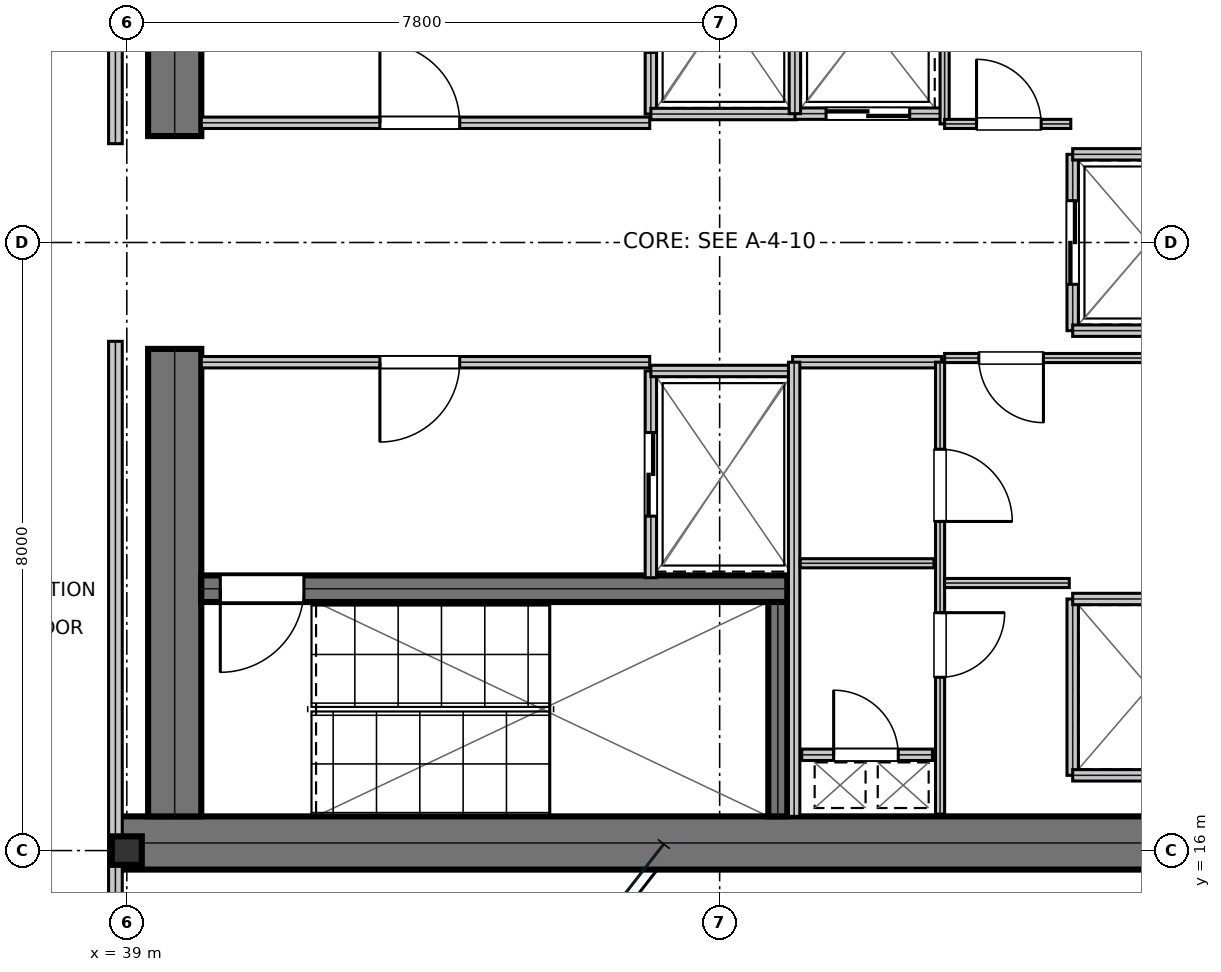
"""IFC4 building model, lengths in metres.
Left out: names, types, materials, properties, quantities, classifications, styles, units other than length and angle.
Written with IfcOpenShell. Run it as: python <this file> out.ifc"""

import sys

from ifc_helpers import new_model, si_unit, direction, frame, frame_2d, origin, origin_2d, place, context, subcontext, project, spatial, rectangle, i_section, extrude, element, fill, save


model = new_model("IFC4")
c1 = context("Model", 3, precision=1e-05, world=origin(), true_north=direction((0.0, 1.0)))
c2 = subcontext(c1, "Body", "Model", "MODEL_VIEW")
j1 = project(units=[si_unit("LENGTHUNIT", "METRE"), si_unit("PLANEANGLEUNIT", "RADIAN")], contexts=[c1])
p1 = place(None, origin())
s1 = spatial("IfcSite", under=j1, at=p1, CompositionType="ELEMENT")
p2 = place(p1, origin())
s2 = spatial("IfcBuilding", under=s1, at=p2, CompositionType="ELEMENT")
p3 = place(p2, frame((0.0, 0.0, 248.55)))
s3 = spatial("IfcBuildingStorey", under=s2, at=p3, CompositionType="ELEMENT", Elevation=248.55)
p4 = place(p3, frame((38.8, 16.1, 0.0), z_axis=(0.0, 0.0, 1.0), x_axis=(1.0, 0.0, 0.0)))
e1 = element("IfcWall", 1, at=p4, inside=s3, PredefinedType="SHEAR", context=c2, shape_type="SweptSolid", body=[
    extrude(rectangle(XDim=16.0, YDim=0.7, at=frame_2d((8.0, 0.0))), origin(), (0.0, 0.0, 1.0), 3.79),
])
for number, where, z_axis, x_axis in (
    (2, (39.63, 16.45, 0.0), (0.0, 0.0, 1.0), (0.0, 1.0, 0.0)),
    (3, (39.63, 25.4, 0.0), (0.0, 0.0, 1.0), (0.0, 1.0, 0.0)),
):
    element("IfcWall", number, at=place(p3, frame(where, z_axis=z_axis, x_axis=x_axis)), inside=s3, PredefinedType="SHEAR", context=c2, shape_type="SweptSolid", body=[
        extrude(rectangle(XDim=6.15, YDim=0.7, at=frame_2d((3.075, 0.0))), origin(), (0.0, 0.0, 1.0), 3.79),
    ])
p5 = place(p3, frame((39.98, 19.445, 0.0), z_axis=(0.0, 0.0, 1.0), x_axis=(1.0, 0.0, 0.0)))
e4 = element("IfcWall", 4, at=p5, inside=s3, PredefinedType="SHEAR", context=c2, shape_type="SweptSolid", body=[
    extrude(rectangle(XDim=7.71, YDim=0.35, at=frame_2d((3.855, 0.0))), origin(), (0.0, 0.0, 1.0), 3.79),
])
p6 = place(p5, frame((0.25, 0.0, 0.0)))
e5 = element("IfcOpeningElement", 5, at=p6, cuts=e4, PredefinedType="OPENING", context=c2, shape_type="SweptSolid", body=[
    extrude(rectangle(XDim=1.1, YDim=2.15, at=frame_2d((0.55, 1.075))), frame((0.0, 0.185, 0.0), z_axis=(0.0, -1.0, 0.0), x_axis=(1.0, 0.0, 0.0)), (0.0, 0.0, 1.0), 0.37),
])
p7 = place(p3, frame((47.565, 16.45, 0.0), z_axis=(0.0, 0.0, 1.0), x_axis=(0.0, 1.0, 0.0)))
e6 = element("IfcWall", 6, at=p7, inside=s3, PredefinedType="SHEAR", context=c2, shape_type="SweptSolid", body=[
    extrude(rectangle(XDim=2.82, YDim=0.25, at=frame_2d((1.41, 0.0))), origin(), (0.0, 0.0, 1.0), 3.79),
])
p8 = place(p3, frame((39.0, 16.0, 0.0), z_axis=(0.0, 0.0, 1.0), x_axis=(1.0, 0.0, 0.0)))
e7 = element("IfcColumn", 7, at=p8, inside=s3, PredefinedType="COLUMN", context=c2, shape_type="SweptSolid", body=[
    extrude(i_section(OverallWidth=0.394, OverallDepth=0.375, WebThickness=0.017, FlangeThickness=0.028, at=origin_2d()), origin(), (0.0, 0.0, 1.0), 4.044),
])
p9 = place(p3, frame((39.98, 25.575, 0.0), z_axis=(0.0, 0.0, 1.0), x_axis=(1.0, 0.0, 0.0)))
e8 = element("IfcWall", 8, at=p9, inside=s3, PredefinedType="PARTITIONING", context=c2, shape_type="SweptSolid", body=[
    extrude(rectangle(XDim=5.9, YDim=0.15, at=frame_2d((2.95, 0.0))), origin(), (0.0, 0.0, 1.0), 3.79),
])
p10 = place(p9, frame((2.35, 0.0, 0.0)))
e9 = element("IfcOpeningElement", 9, at=p10, cuts=e8, PredefinedType="OPENING", context=c2, shape_type="SweptSolid", body=[
    extrude(rectangle(XDim=1.05, YDim=2.15, at=frame_2d((0.525, 1.075))), frame((0.0, 0.085, 0.0), z_axis=(0.0, -1.0, 0.0), x_axis=(1.0, 0.0, 0.0)), (0.0, 0.0, 1.0), 0.17),
])
p11 = place(p3, frame((39.98, 22.425, 0.0), z_axis=(0.0, 0.0, 1.0), x_axis=(1.0, 0.0, 0.0)))
e10 = element("IfcWall", 10, at=p11, inside=s3, PredefinedType="PARTITIONING", context=c2, shape_type="SweptSolid", body=[
    extrude(rectangle(XDim=5.9, YDim=0.15, at=frame_2d((2.95, 0.0))), origin(), (0.0, 0.0, 1.0), 3.79),
])
p12 = place(p11, frame((2.35, 0.0, 0.0)))
e11 = element("IfcOpeningElement", 11, at=p12, cuts=e10, PredefinedType="OPENING", context=c2, shape_type="SweptSolid", body=[
    extrude(rectangle(XDim=1.05, YDim=2.15, at=frame_2d((0.525, 1.075))), frame((0.0, 0.085, 0.0), z_axis=(0.0, -1.0, 0.0), x_axis=(1.0, 0.0, 0.0)), (0.0, 0.0, 1.0), 0.17),
])
p13 = place(p3, frame((45.895, 25.69, 0.0), z_axis=(0.0, 0.0, 1.0), x_axis=(0.0, 1.0, 0.0)))
e12 = element("IfcWall", 12, at=p13, inside=s3, PredefinedType="PARTITIONING", context=c2, shape_type="SweptSolid", body=[
    extrude(rectangle(XDim=2.72, YDim=0.15, at=frame_2d((1.36, 0.0))), origin(), (0.0, 0.0, 1.0), 3.79),
])
p14 = place(p13, frame((0.81, 0.0, 0.0)))
e13 = element("IfcOpeningElement", 13, at=p14, cuts=e12, PredefinedType="OPENING", context=c2, shape_type="SweptSolid", body=[
    extrude(rectangle(XDim=1.1, YDim=2.15, at=frame_2d((0.55, 1.075))), frame((0.0, 0.085, 0.0), z_axis=(0.0, -1.0, 0.0), x_axis=(1.0, 0.0, 0.0)), (0.0, 0.0, 1.0), 0.17),
])
p15 = place(p3, frame((45.895, 25.69, 0.0), z_axis=(0.0, 0.0, 1.0), x_axis=(1.0, 0.0, 0.0)))
e14 = element("IfcWall", 14, at=p15, inside=s3, PredefinedType="PARTITIONING", context=c2, shape_type="SweptSolid", body=[
    extrude(rectangle(XDim=1.915, YDim=0.15, at=frame_2d((0.958, 0.0))), origin(), (0.0, 0.0, 1.0), 3.79),
])
p16 = place(p3, frame((45.895, 19.59, 0.0), z_axis=(0.0, 0.0, 1.0), x_axis=(0.0, 1.0, 0.0)))
e15 = element("IfcWall", 15, at=p16, inside=s3, PredefinedType="PARTITIONING", context=c2, shape_type="SweptSolid", body=[
    extrude(rectangle(XDim=2.72, YDim=0.15, at=frame_2d((1.36, 0.0))), origin(), (0.0, 0.0, 1.0), 3.79),
])
p17 = place(p16, frame((0.81, 0.0, 0.0)))
e16 = element("IfcOpeningElement", 16, at=p17, cuts=e15, PredefinedType="OPENING", context=c2, shape_type="SweptSolid", body=[
    extrude(rectangle(XDim=1.1, YDim=2.15, at=frame_2d((0.55, 1.075))), frame((0.0, 0.085, 0.0), z_axis=(0.0, -1.0, 0.0), x_axis=(1.0, 0.0, 0.0)), (0.0, 0.0, 1.0), 0.17),
])
p18 = place(p3, frame((45.895, 22.31, 0.0), z_axis=(0.0, 0.0, 1.0), x_axis=(1.0, 0.0, 0.0)))
e17 = element("IfcWall", 17, at=p18, inside=s3, PredefinedType="PARTITIONING", context=c2, shape_type="SweptSolid", body=[
    extrude(rectangle(XDim=1.915, YDim=0.15, at=frame_2d((0.958, 0.0))), origin(), (0.0, 0.0, 1.0), 3.79),
])
p19 = place(p3, frame((47.79, 25.695, 0.0), z_axis=(0.0, 0.0, 1.0), x_axis=(1.0, 0.0, 0.0)))
e18 = element("IfcWall", 18, at=p19, inside=s3, PredefinedType="PARTITIONING", context=c2, shape_type="SweptSolid", body=[
    extrude(rectangle(XDim=1.92, YDim=0.15, at=frame_2d((0.96, 0.0))), origin(), (0.0, 0.0, 1.0), 3.79),
])
p20 = place(p19, frame((0.41, 0.0, 0.0)))
e19 = element("IfcOpeningElement", 19, at=p20, cuts=e18, PredefinedType="OPENING", context=c2, shape_type="SweptSolid", body=[
    extrude(rectangle(XDim=1.1, YDim=2.15, at=frame_2d((0.55, 1.075))), frame((0.0, 0.085, 0.0), z_axis=(0.0, -1.0, 0.0), x_axis=(1.0, 0.0, 0.0)), (0.0, 0.0, 1.0), 0.17),
])
p21 = place(p3, frame((47.79, 25.695, 0.0), z_axis=(0.0, 0.0, 1.0), x_axis=(0.0, 1.0, 0.0)))
e20 = element("IfcWall", 20, at=p21, inside=s3, PredefinedType="PARTITIONING", context=c2, shape_type="SweptSolid", body=[
    extrude(rectangle(XDim=2.415, YDim=0.15, at=frame_2d((1.208, 0.0))), origin(), (0.0, 0.0, 1.0), 3.79),
])
p22 = place(p3, frame((51.445, 22.84, 0.0), z_axis=(0.0, 0.0, 1.0), x_axis=(0.0, 1.0, 0.0)))
e21 = element("IfcWall", 21, at=p22, inside=s3, PredefinedType="PARTITIONING", context=c2, shape_type="SweptSolid", body=[
    extrude(rectangle(XDim=2.32, YDim=0.15, at=frame_2d((1.16, 0.0))), origin(), (0.0, 0.0, 1.0), 3.79),
])
p23 = place(p22, frame((0.61, 0.0, 0.0)))
e22 = element("IfcOpeningElement", 22, at=p23, cuts=e21, PredefinedType="OPENING", context=c2, shape_type="SweptSolid", body=[
    extrude(rectangle(XDim=1.1, YDim=2.15, at=frame_2d((0.55, 1.075))), frame((0.0, 0.085, 0.0), z_axis=(0.0, -1.0, 0.0), x_axis=(1.0, 0.0, 0.0)), (0.0, 0.0, 1.0), 0.17),
])
for number, where, z_axis, x_axis in (
    (23, (51.445, 22.84, 0.0), (0.0, 0.0, 1.0), (1.0, 0.0, 0.0)),
    (24, (51.445, 25.16, 0.0), (0.0, 0.0, 1.0), (1.0, 0.0, 0.0)),
):
    element("IfcWall", number, at=place(p3, frame(where, z_axis=z_axis, x_axis=x_axis)), inside=s3, PredefinedType="PARTITIONING", context=c2, shape_type="SweptSolid", body=[
        extrude(rectangle(XDim=2.015, YDim=0.15, at=frame_2d((1.007, 0.0))), origin(), (0.0, 0.0, 1.0), 3.79),
    ])
p24 = place(p3, frame((51.445, 16.99, 0.0), z_axis=(0.0, 0.0, 1.0), x_axis=(0.0, 1.0, 0.0)))
e25 = element("IfcWall", 25, at=p24, inside=s3, PredefinedType="PARTITIONING", context=c2, shape_type="SweptSolid", body=[
    extrude(rectangle(XDim=2.32, YDim=0.15, at=frame_2d((1.16, 0.0))), origin(), (0.0, 0.0, 1.0), 3.79),
])
for number, where, z_axis, x_axis in (
    (26, (51.445, 16.99, 0.0), (0.0, 0.0, 1.0), (1.0, 0.0, 0.0)),
    (27, (51.445, 19.31, 0.0), (0.0, 0.0, 1.0), (1.0, 0.0, 0.0)),
):
    element("IfcWall", number, at=place(p3, frame(where, z_axis=z_axis, x_axis=x_axis)), inside=s3, PredefinedType="PARTITIONING", context=c2, shape_type="SweptSolid", body=[
        extrude(rectangle(XDim=2.015, YDim=0.15, at=frame_2d((1.007, 0.0))), origin(), (0.0, 0.0, 1.0), 3.79),
    ])
p25 = place(p3, frame((47.88, 17.26, 0.0), z_axis=(0.0, 0.0, 1.0), x_axis=(1.0, 0.0, 0.0)))
e28 = element("IfcWall", 28, at=p25, inside=s3, PredefinedType="PARTITIONING", context=c2, shape_type="SweptSolid", body=[
    extrude(rectangle(XDim=1.72, YDim=0.15, at=frame_2d((0.86, 0.0))), origin(), (0.0, 0.0, 1.0), 3.79),
])
p26 = place(p25, frame((0.42, 0.0, 0.0)))
e29 = element("IfcOpeningElement", 29, at=p26, cuts=e28, PredefinedType="OPENING", context=c2, shape_type="SweptSolid", body=[
    extrude(rectangle(XDim=0.85, YDim=2.15, at=frame_2d((0.425, 1.075))), frame((0.0, 0.085, 0.0), z_axis=(0.0, -1.0, 0.0), x_axis=(1.0, 0.0, 0.0)), (0.0, 0.0, 1.0), 0.17),
])
p27 = place(p3, frame((47.76, 22.425, 0.0), z_axis=(0.0, 0.0, 1.0), x_axis=(1.0, 0.0, 0.0)))
e30 = element("IfcWall", 30, at=p27, inside=s3, PredefinedType="PARTITIONING", context=c2, shape_type="SweptSolid", body=[
    extrude(rectangle(XDim=1.96, YDim=0.15, at=frame_2d((0.98, 0.0))), origin(), (0.0, 0.0, 1.0), 3.79),
])
p28 = place(p3, frame((47.78, 16.45, 0.0), z_axis=(0.0, 0.0, 1.0), x_axis=(0.0, 1.0, 0.0)))
e31 = element("IfcWall", 31, at=p28, inside=s3, PredefinedType="PARTITIONING", context=c2, shape_type="SweptSolid", body=[
    extrude(rectangle(XDim=5.975, YDim=0.15, at=frame_2d((2.988, 0.0))), origin(), (0.0, 0.0, 1.0), 3.79),
])
p29 = place(p3, frame((47.86, 19.78, 0.0), z_axis=(0.0, 0.0, 1.0), x_axis=(1.0, 0.0, 0.0)))
e32 = element("IfcWall", 32, at=p29, inside=s3, PredefinedType="PARTITIONING", context=c2, shape_type="SweptSolid", body=[
    extrude(rectangle(XDim=1.76, YDim=0.12, at=frame_2d((0.88, 0.0))), origin(), (0.0, 0.0, 1.0), 3.79),
])
p30 = place(p3, frame((49.7, 16.48, 0.0), z_axis=(0.0, 0.0, 1.0), x_axis=(0.0, 1.0, 0.0)))
e33 = element("IfcWall", 33, at=p30, inside=s3, PredefinedType="PARTITIONING", context=c2, shape_type="SweptSolid", body=[
    extrude(rectangle(XDim=5.945, YDim=0.12, at=frame_2d((2.973, 0.0))), origin(), (0.0, 0.0, 1.0), 3.79),
])
p31 = place(p30, frame((1.8, 0.0, 0.0)))
e34 = element("IfcOpeningElement", 34, at=p31, cuts=e33, PredefinedType="OPENING", context=c2, shape_type="SweptSolid", body=[
    extrude(rectangle(XDim=0.85, YDim=2.15, at=frame_2d((0.425, 1.075))), frame((0.0, 0.07, 0.0), z_axis=(0.0, -1.0, 0.0), x_axis=(1.0, 0.0, 0.0)), (0.0, 0.0, 1.0), 0.14),
])
p32 = place(p30, frame((3.85, 0.0, 0.0)))
e35 = element("IfcOpeningElement", 35, at=p32, cuts=e33, PredefinedType="OPENING", context=c2, shape_type="SweptSolid", body=[
    extrude(rectangle(XDim=0.95, YDim=2.15, at=frame_2d((0.475, 1.075))), frame((0.0, 0.07, 0.0), z_axis=(0.0, -1.0, 0.0), x_axis=(1.0, 0.0, 0.0)), (0.0, 0.0, 1.0), 0.14),
])
p33 = place(p3, frame((49.76, 22.48, 0.0), z_axis=(0.0, 0.0, 1.0), x_axis=(1.0, 0.0, 0.0)))
e36 = element("IfcWall", 36, at=p33, inside=s3, PredefinedType="PARTITIONING", context=c2, shape_type="SweptSolid", body=[
    extrude(rectangle(XDim=3.9, YDim=0.12, at=frame_2d((1.95, 0.0))), origin(), (0.0, 0.0, 1.0), 3.79),
])
p34 = place(p33, frame((0.45, 0.0, 0.0)))
e37 = element("IfcOpeningElement", 37, at=p34, cuts=e36, PredefinedType="OPENING", context=c2, shape_type="SweptSolid", body=[
    extrude(rectangle(XDim=0.85, YDim=2.15, at=frame_2d((0.425, 1.075))), frame((0.0, 0.07, 0.0), z_axis=(0.0, -1.0, 0.0), x_axis=(1.0, 0.0, 0.0)), (0.0, 0.0, 1.0), 0.14),
])
p35 = place(p3, frame((49.76, 19.52, 0.0), z_axis=(0.0, 0.0, 1.0), x_axis=(1.0, 0.0, 0.0)))
e38 = element("IfcWall", 38, at=p35, inside=s3, PredefinedType="PARTITIONING", context=c2, shape_type="SweptSolid", body=[
    extrude(rectangle(XDim=1.64, YDim=0.12, at=frame_2d((0.82, 0.0))), origin(), (0.0, 0.0, 1.0), 3.79),
])
p36 = place(p3, frame((49.76, 25.56, 0.0), z_axis=(0.0, 0.0, 1.0), x_axis=(0.0, 1.0, 0.0)))
e39 = element("IfcWall", 39, at=p36, inside=s3, PredefinedType="PARTITIONING", context=c2, shape_type="SweptSolid", body=[
    extrude(rectangle(XDim=2.66, YDim=0.12, at=frame_2d((1.33, 0.0))), origin(), (0.0, 0.0, 1.0), 3.79),
])
p37 = place(p3, frame((49.76, 25.56, 0.0), z_axis=(0.0, 0.0, 1.0), x_axis=(1.0, 0.0, 0.0)))
e40 = element("IfcWall", 40, at=p37, inside=s3, PredefinedType="PARTITIONING", context=c2, shape_type="SweptSolid", body=[
    extrude(rectangle(XDim=1.66, YDim=0.12, at=frame_2d((0.83, 0.0))), origin(), (0.0, 0.0, 1.0), 3.79),
])
p38 = place(p37, frame((0.42, 0.0, 0.0)))
e41 = element("IfcOpeningElement", 41, at=p38, cuts=e40, PredefinedType="OPENING", context=c2, shape_type="SweptSolid", body=[
    extrude(rectangle(XDim=0.85, YDim=2.15, at=frame_2d((0.425, 1.075))), frame((0.0, 0.07, 0.0), z_axis=(0.0, -1.0, 0.0), x_axis=(1.0, 0.0, 0.0)), (0.0, 0.0, 1.0), 0.14),
])
for number, where, z_axis, x_axis in (
    (42, (38.85, 14.5, 0.0), (0.0, 0.0, 1.0), (0.0, 1.0, 0.0)),
    (43, (38.85, 25.3, 0.0), (0.0, 0.0, 1.0), (0.0, 1.0, 0.0)),
):
    element("IfcWall", number, at=place(p3, frame(where, z_axis=z_axis, x_axis=x_axis)), inside=s3, PredefinedType="SOLIDWALL", context=c2, shape_type="SweptSolid", body=[
        extrude(rectangle(XDim=8.2, YDim=0.18, at=frame_2d((4.1, 0.0))), origin(), (0.0, 0.0, 1.0), 3.241),
    ])
p39 = place(p10, origin())
e44 = element("IfcDoor", 44, at=p39, inside=s3, OperationType="SINGLE_SWING_LEFT", PredefinedType="DOOR", context=c2, shape_type="SweptSolid", body=[
    extrude(rectangle(XDim=1.05, YDim=2.15, at=frame_2d((0.525, 1.075))), frame((0.0, 0.025, 0.0), z_axis=(0.0, -1.0, 0.0), x_axis=(1.0, 0.0, 0.0)), (0.0, 0.0, 1.0), 0.05),
])
fill(e9, e44)
p40 = place(p12, frame((1.05, 0.0, 0.0), z_axis=(0.0, 0.0, 1.0), x_axis=(-1.0, 0.0, 0.0)))
e45 = element("IfcDoor", 45, at=p40, inside=s3, OperationType="SINGLE_SWING_RIGHT", PredefinedType="DOOR", context=c2, shape_type="SweptSolid", body=[
    extrude(rectangle(XDim=1.05, YDim=2.15, at=frame_2d((0.525, 1.075))), frame((0.0, 0.025, 0.0), z_axis=(0.0, -1.0, 0.0), x_axis=(1.0, 0.0, 0.0)), (0.0, 0.0, 1.0), 0.05),
])
fill(e11, e45)
p41 = place(p17, frame((1.1, 0.0, 0.0), z_axis=(0.0, 0.0, 1.0), x_axis=(-1.0, 0.0, 0.0)))
e46 = element("IfcDoor", 46, at=p41, inside=s3, OperationType="DOUBLE_DOOR_SLIDING", PredefinedType="DOOR", context=c2, shape_type="SweptSolid", body=[
    extrude(rectangle(XDim=1.1, YDim=2.15, at=frame_2d((0.55, 1.075))), frame((0.0, 0.025, 0.0), z_axis=(0.0, -1.0, 0.0), x_axis=(1.0, 0.0, 0.0)), (0.0, 0.0, 1.0), 0.05),
])
fill(e16, e46)
p42 = place(p20, frame((1.1, 0.0, 0.0), z_axis=(0.0, 0.0, 1.0), x_axis=(-1.0, 0.0, 0.0)))
e47 = element("IfcDoor", 47, at=p42, inside=s3, OperationType="DOUBLE_DOOR_SLIDING", PredefinedType="DOOR", context=c2, shape_type="SweptSolid", body=[
    extrude(rectangle(XDim=1.1, YDim=2.15, at=frame_2d((0.55, 1.075))), frame((0.0, 0.025, 0.0), z_axis=(0.0, -1.0, 0.0), x_axis=(1.0, 0.0, 0.0)), (0.0, 0.0, 1.0), 0.05),
])
fill(e19, e47)
p43 = place(p23, frame((1.1, 0.0, 0.0), z_axis=(0.0, 0.0, 1.0), x_axis=(-1.0, 0.0, 0.0)))
e48 = element("IfcDoor", 48, at=p43, inside=s3, OperationType="DOUBLE_DOOR_SLIDING", PredefinedType="DOOR", context=c2, shape_type="SweptSolid", body=[
    extrude(rectangle(XDim=1.1, YDim=2.15, at=frame_2d((0.55, 1.075))), frame((0.0, 0.025, 0.0), z_axis=(0.0, -1.0, 0.0), x_axis=(1.0, 0.0, 0.0)), (0.0, 0.0, 1.0), 0.05),
])
fill(e22, e48)
p44 = place(p26, origin())
e49 = element("IfcDoor", 49, at=p44, inside=s3, OperationType="SINGLE_SWING_LEFT", PredefinedType="TRAPDOOR", context=c2, shape_type="SweptSolid", body=[
    extrude(rectangle(XDim=0.85, YDim=2.15, at=frame_2d((0.425, 1.075))), frame((0.0, 0.025, 0.0), z_axis=(0.0, -1.0, 0.0), x_axis=(1.0, 0.0, 0.0)), (0.0, 0.0, 1.0), 0.05),
])
fill(e29, e49)
p45 = place(p31, frame((0.85, 0.0, 0.0), z_axis=(0.0, 0.0, 1.0), x_axis=(-1.0, 0.0, 0.0)))
e50 = element("IfcDoor", 50, at=p45, inside=s3, OperationType="SINGLE_SWING_LEFT", PredefinedType="DOOR", context=c2, shape_type="SweptSolid", body=[
    extrude(rectangle(XDim=0.85, YDim=2.15, at=frame_2d((0.425, 1.075))), frame((0.0, 0.025, 0.0), z_axis=(0.0, -1.0, 0.0), x_axis=(1.0, 0.0, 0.0)), (0.0, 0.0, 1.0), 0.05),
])
fill(e34, e50)
p46 = place(p32, frame((0.95, 0.0, 0.0), z_axis=(0.0, 0.0, 1.0), x_axis=(-1.0, 0.0, 0.0)))
e51 = element("IfcDoor", 51, at=p46, inside=s3, OperationType="SINGLE_SWING_RIGHT", PredefinedType="DOOR", context=c2, shape_type="SweptSolid", body=[
    extrude(rectangle(XDim=0.95, YDim=2.15, at=frame_2d((0.475, 1.075))), frame((0.0, 0.025, 0.0), z_axis=(0.0, -1.0, 0.0), x_axis=(1.0, 0.0, 0.0)), (0.0, 0.0, 1.0), 0.05),
])
fill(e35, e51)
p47 = place(p34, frame((0.85, 0.0, 0.0), z_axis=(0.0, 0.0, 1.0), x_axis=(-1.0, 0.0, 0.0)))
e52 = element("IfcDoor", 52, at=p47, inside=s3, OperationType="SINGLE_SWING_LEFT", PredefinedType="DOOR", context=c2, shape_type="SweptSolid", body=[
    extrude(rectangle(XDim=0.85, YDim=2.15, at=frame_2d((0.425, 1.075))), frame((0.0, 0.025, 0.0), z_axis=(0.0, -1.0, 0.0), x_axis=(1.0, 0.0, 0.0)), (0.0, 0.0, 1.0), 0.05),
])
fill(e37, e52)
p48 = place(p38, origin())
e53 = element("IfcDoor", 53, at=p48, inside=s3, OperationType="SINGLE_SWING_LEFT", PredefinedType="DOOR", context=c2, shape_type="SweptSolid", body=[
    extrude(rectangle(XDim=0.85, YDim=2.15, at=frame_2d((0.425, 1.075))), frame((0.0, 0.025, 0.0), z_axis=(0.0, -1.0, 0.0), x_axis=(1.0, 0.0, 0.0)), (0.0, 0.0, 1.0), 0.05),
])
fill(e41, e53)
p49 = place(p6, frame((1.1, 0.0, 0.0), z_axis=(0.0, 0.0, 1.0), x_axis=(-1.0, 0.0, 0.0)))
e54 = element("IfcDoor", 54, at=p49, inside=s3, OperationType="SINGLE_SWING_RIGHT", PredefinedType="DOOR", context=c2, shape_type="SweptSolid", body=[
    extrude(rectangle(XDim=1.1, YDim=2.15, at=frame_2d((0.55, 1.075))), frame((0.0, 0.025, 0.0), z_axis=(0.0, -1.0, 0.0), x_axis=(1.0, 0.0, 0.0)), (0.0, 0.0, 1.0), 0.05),
])
fill(e5, e54)
save(model, sys.argv[1])
